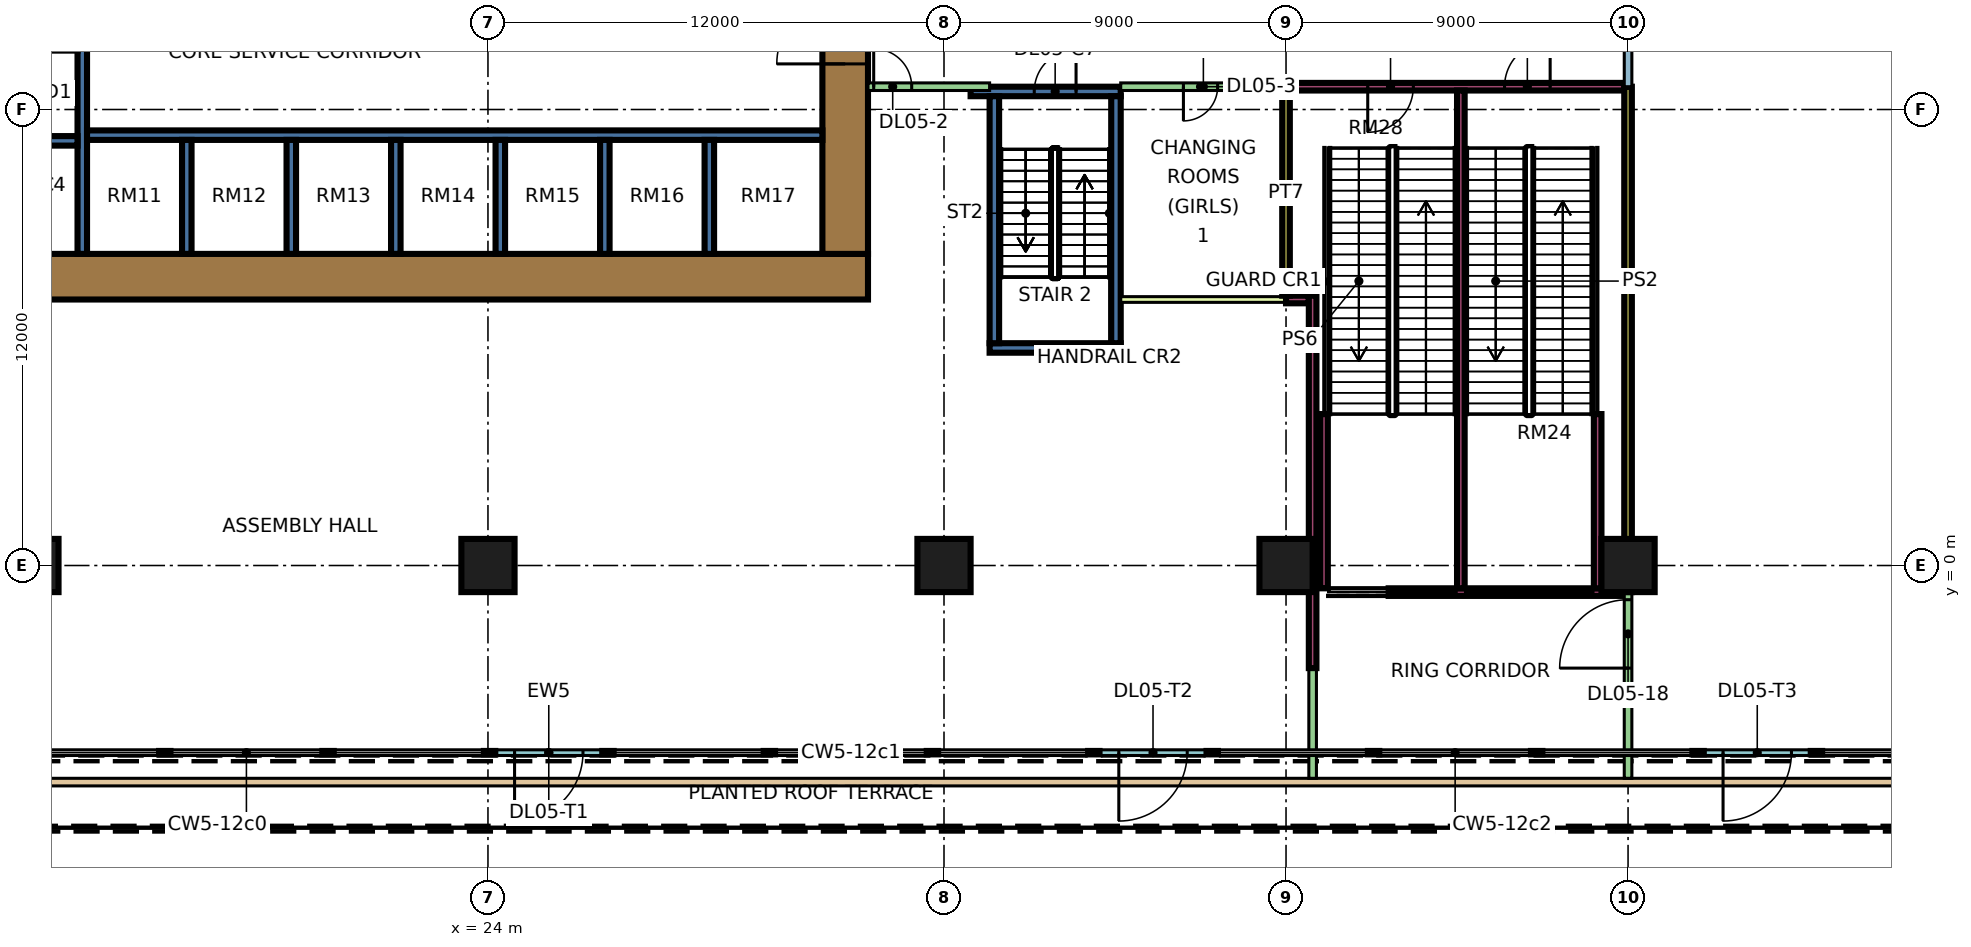
"""IFC4 building model, lengths in metres.
Left out: names, types, materials, properties, quantities, classifications, styles, units other than length and angle.
Written with IfcOpenShell. Run it as: python <this file> out.ifc"""

import sys

from ifc_helpers import new_model, si_unit, direction, frame, frame_2d, origin, origin_2d, place, context, subcontext, project, spatial, rectangle, extrude, element, fill, save


model = new_model("IFC4")
c1 = context("Model", 3, precision=1e-05, world=origin(), true_north=direction((0.0, 1.0)))
c2 = subcontext(c1, "Body", "Model", "MODEL_VIEW")
j1 = project(units=[si_unit("LENGTHUNIT", "METRE"), si_unit("PLANEANGLEUNIT", "RADIAN")], contexts=[c1])
p1 = place(None, origin())
s1 = spatial("IfcSite", under=j1, at=p1, CompositionType="ELEMENT")
p2 = place(p1, origin())
s2 = spatial("IfcBuilding", under=s1, at=p2, CompositionType="ELEMENT")
p3 = place(p2, frame((0.0, 0.0, 26.4)))
s3 = spatial("IfcBuildingStorey", under=s2, at=p3, CompositionType="ELEMENT", Elevation=26.4)
for number, where, z_axis, x_axis in (
    (1, (12.0, 0.0, 0.0), (0.0, 0.0, 1.0), (1.0, 0.0, 0.0)),
    (2, (24.0, 0.0, 0.0), (0.0, 0.0, 1.0), (1.0, 0.0, 0.0)),
    (3, (36.0, 0.0, 0.0), (0.0, 0.0, 1.0), (1.0, 0.0, 0.0)),
    (4, (45.0, 0.0, 0.0), (0.0, 0.0, 1.0), (1.0, 0.0, 0.0)),
    (5, (54.0, 0.0, 0.0), (0.0, 0.0, 1.0), (1.0, 0.0, 0.0)),
):
    element("IfcColumn", number, at=place(p3, frame(where, z_axis=z_axis, x_axis=x_axis)), inside=s3, PredefinedType="COLUMN", context=c2, shape_type="SweptSolid", body=[
        extrude(rectangle(XDim=1.4, YDim=1.4, at=origin_2d()), origin(), (0.0, 0.0, 1.0), 9.0),
    ])
p4 = place(p3, frame((9.0, 7.6, 0.0), z_axis=(0.0, 0.0, 1.0), x_axis=(1.0, 0.0, 0.0)))
e6 = element("IfcWall", 6, at=p4, inside=s3, PredefinedType="SHEAR", context=c2, shape_type="SweptSolid", body=[
    extrude(rectangle(XDim=25.0, YDim=1.2, at=frame_2d((12.5, 0.0))), origin(), (0.0, 0.0, 1.0), 9.0),
])
p5 = place(p3, frame((33.4, 8.2, 0.0), z_axis=(0.0, 0.0, 1.0), x_axis=(0.0, 1.0, 0.0)))
e7 = element("IfcWall", 7, at=p5, inside=s3, PredefinedType="SHEAR", context=c2, shape_type="SweptSolid", body=[
    extrude(rectangle(XDim=10.6, YDim=1.2, at=frame_2d((5.3, 0.0))), origin(), (0.0, 0.0, 1.0), 9.0),
])
p6 = place(p5, frame((5.0, 0.0, 0.0)))
e8 = element("IfcOpeningElement", 8, at=p6, cuts=e7, PredefinedType="OPENING", context=c2, shape_type="SweptSolid", body=[
    extrude(rectangle(XDim=1.8, YDim=2.4, at=frame_2d((0.9, 1.2))), frame((0.0, 0.61, 0.0), z_axis=(0.0, -1.0, 0.0), x_axis=(1.0, 0.0, 0.0)), (0.0, 0.0, 1.0), 1.22),
])
p7 = place(p3, frame((13.325, 8.2, 0.0), z_axis=(0.0, 0.0, 1.0), x_axis=(0.0, 1.0, 0.0)))
e9 = element("IfcWall", 9, at=p7, inside=s3, PredefinedType="SHEAR", context=c2, shape_type="SweptSolid", body=[
    extrude(rectangle(XDim=10.6, YDim=0.25, at=frame_2d((5.3, 0.0))), origin(), (0.0, 0.0, 1.0), 9.0),
])
p8 = place(p3, frame((13.45, 11.325, 0.0), z_axis=(0.0, 0.0, 1.0), x_axis=(1.0, 0.0, 0.0)))
e10 = element("IfcWall", 10, at=p8, inside=s3, PredefinedType="SHEAR", context=c2, shape_type="SweptSolid", body=[
    extrude(rectangle(XDim=19.35, YDim=0.25, at=frame_2d((9.675, 0.0))), origin(), (0.0, 0.0, 1.0), 9.0),
])
for number, where, z_axis, x_axis in (
    (11, (10.2, 11.175, 0.0), (0.0, 0.0, 1.0), (1.0, 0.0, 0.0)),
    (12, (16.075, 8.2, 0.0), (0.0, 0.0, 1.0), (0.0, 1.0, 0.0)),
    (13, (18.825, 8.2, 0.0), (0.0, 0.0, 1.0), (0.0, 1.0, 0.0)),
    (14, (21.575, 8.2, 0.0), (0.0, 0.0, 1.0), (0.0, 1.0, 0.0)),
    (15, (24.325, 8.2, 0.0), (0.0, 0.0, 1.0), (0.0, 1.0, 0.0)),
    (16, (27.075, 8.2, 0.0), (0.0, 0.0, 1.0), (0.0, 1.0, 0.0)),
    (17, (29.825, 8.2, 0.0), (0.0, 0.0, 1.0), (0.0, 1.0, 0.0)),
):
    element("IfcWall", number, at=place(p3, frame(where, z_axis=z_axis, x_axis=x_axis)), inside=s3, PredefinedType="SHEAR", context=c2, shape_type="SweptSolid", body=[
        extrude(rectangle(XDim=3.0, YDim=0.25, at=frame_2d((1.5, 0.0))), origin(), (0.0, 0.0, 1.0), 9.0),
    ])
p9 = place(p3, frame((37.2, 5.725, 0.0), z_axis=(0.0, 0.0, 1.0), x_axis=(1.0, 0.0, 0.0)))
e18 = element("IfcWall", 18, at=p9, inside=s3, PredefinedType="SHEAR", context=c2, shape_type="SweptSolid", body=[
    extrude(rectangle(XDim=3.45, YDim=0.25, at=frame_2d((1.725, 0.0))), origin(), (0.0, 0.0, 1.0), 9.0),
])
p10 = place(p3, frame((36.7, 12.475, 0.0), z_axis=(0.0, 0.0, 1.0), x_axis=(1.0, 0.0, 0.0)))
e19 = element("IfcWall", 19, at=p10, inside=s3, PredefinedType="SHEAR", context=c2, shape_type="SweptSolid", body=[
    extrude(rectangle(XDim=3.95, YDim=0.25, at=frame_2d((1.975, 0.0))), origin(), (0.0, 0.0, 1.0), 9.0),
])
p11 = place(p10, frame((1.675, 0.0, 0.0)))
e20 = element("IfcOpeningElement", 20, at=p11, cuts=e19, PredefinedType="OPENING", context=c2, shape_type="SweptSolid", body=[
    extrude(rectangle(XDim=1.1, YDim=2.2, at=frame_2d((0.55, 1.1))), frame((0.0, 0.135, 0.0), z_axis=(0.0, -1.0, 0.0), x_axis=(1.0, 0.0, 0.0)), (0.0, 0.0, 1.0), 0.27),
])
for number, where, z_axis, x_axis in (
    (21, (37.325, 5.85, 0.0), (0.0, 0.0, 1.0), (0.0, 1.0, 0.0)),
    (22, (40.525, 5.85, 0.0), (0.0, 0.0, 1.0), (0.0, 1.0, 0.0)),
):
    element("IfcWall", number, at=place(p3, frame(where, z_axis=z_axis, x_axis=x_axis)), inside=s3, PredefinedType="SHEAR", context=c2, shape_type="SweptSolid", body=[
        extrude(rectangle(XDim=6.5, YDim=0.25, at=frame_2d((3.25, 0.0))), origin(), (0.0, 0.0, 1.0), 9.0),
    ])
p12 = place(p3, frame((24.1, -4.925, 0.0), z_axis=(0.0, 0.0, 1.0), x_axis=(1.0, 0.0, 0.0)))
e23 = element("IfcWall", 23, at=p12, inside=s3, PredefinedType="SOLIDWALL", context=c2, shape_type="SweptSolid", body=[
    extrude(rectangle(XDim=3.0, YDim=0.15, at=frame_2d((1.5, 0.0))), origin(), (0.0, 0.0, 1.0), 8.45),
])
p13 = place(p12, frame((0.6, 0.0, 0.0)))
e24 = element("IfcOpeningElement", 24, at=p13, cuts=e23, PredefinedType="OPENING", context=c2, shape_type="SweptSolid", body=[
    extrude(rectangle(XDim=1.8, YDim=2.4, at=frame_2d((0.9, 1.2))), frame((0.0, 0.085, 0.0), z_axis=(0.0, -1.0, 0.0), x_axis=(1.0, 0.0, 0.0)), (0.0, 0.0, 1.0), 0.17),
])
p14 = place(p3, frame((40.0, -4.925, 0.0), z_axis=(0.0, 0.0, 1.0), x_axis=(1.0, 0.0, 0.0)))
e25 = element("IfcWall", 25, at=p14, inside=s3, PredefinedType="SOLIDWALL", context=c2, shape_type="SweptSolid", body=[
    extrude(rectangle(XDim=3.0, YDim=0.15, at=frame_2d((1.5, 0.0))), origin(), (0.0, 0.0, 1.0), 8.45),
])
p15 = place(p14, frame((0.6, 0.0, 0.0)))
e26 = element("IfcOpeningElement", 26, at=p15, cuts=e25, PredefinedType="OPENING", context=c2, shape_type="SweptSolid", body=[
    extrude(rectangle(XDim=1.8, YDim=2.4, at=frame_2d((0.9, 1.2))), frame((0.0, 0.085, 0.0), z_axis=(0.0, -1.0, 0.0), x_axis=(1.0, 0.0, 0.0)), (0.0, 0.0, 1.0), 0.17),
])
p16 = place(p3, frame((55.9, -4.925, 0.0), z_axis=(0.0, 0.0, 1.0), x_axis=(1.0, 0.0, 0.0)))
e27 = element("IfcWall", 27, at=p16, inside=s3, PredefinedType="SOLIDWALL", context=c2, shape_type="SweptSolid", body=[
    extrude(rectangle(XDim=3.0, YDim=0.15, at=frame_2d((1.5, 0.0))), origin(), (0.0, 0.0, 1.0), 8.45),
])
p17 = place(p16, frame((0.6, 0.0, 0.0)))
e28 = element("IfcOpeningElement", 28, at=p17, cuts=e27, PredefinedType="OPENING", context=c2, shape_type="SweptSolid", body=[
    extrude(rectangle(XDim=1.8, YDim=2.4, at=frame_2d((0.9, 1.2))), frame((0.0, 0.085, 0.0), z_axis=(0.0, -1.0, 0.0), x_axis=(1.0, 0.0, 0.0)), (0.0, 0.0, 1.0), 0.17),
])
p18 = place(p3, frame((72.24, -5.7, 0.0), z_axis=(0.0, 0.0, 1.0), x_axis=(-1.0, 0.0, 0.0)))
e29 = element("IfcWall", 29, at=p18, inside=s3, PredefinedType="PARAPET", context=c2, shape_type="SweptSolid", body=[
    extrude(rectangle(XDim=61.479, YDim=0.2, at=frame_2d((30.74, 0.0))), origin(), (0.0, 0.0, 1.0), 0.5),
])
p19 = place(p3, frame((34.0, 12.6, 0.0), z_axis=(0.0, 0.0, 1.0), x_axis=(1.0, 0.0, 0.0)))
e30 = element("IfcWall", 30, at=p19, inside=s3, PredefinedType="PARTITIONING", context=c2, shape_type="SweptSolid", body=[
    extrude(rectangle(XDim=3.2, YDim=0.2, at=frame_2d((1.6, 0.0))), origin(), (0.0, 0.0, 1.0), 8.45),
])
p20 = place(p19, frame((0.15, 0.0, 0.0)))
e31 = element("IfcOpeningElement", 31, at=p20, cuts=e30, PredefinedType="OPENING", context=c2, shape_type="SweptSolid", body=[
    extrude(rectangle(XDim=1.0, YDim=2.1, at=frame_2d((0.5, 1.05))), frame((0.0, 0.11, 0.0), z_axis=(0.0, -1.0, 0.0), x_axis=(1.0, 0.0, 0.0)), (0.0, 0.0, 1.0), 0.22),
])
p21 = place(p3, frame((40.65, 7.0, 0.0), z_axis=(0.0, 0.0, 1.0), x_axis=(1.0, 0.0, 0.0)))
e32 = element("IfcWall", 32, at=p21, inside=s3, PredefinedType="PARTITIONING", context=c2, shape_type="SweptSolid", body=[
    extrude(rectangle(XDim=4.35, YDim=0.15, at=frame_2d((2.175, 0.0))), origin(), (0.0, 0.0, 1.0), 8.45),
])
p22 = place(p3, frame((40.65, 12.6, 0.0), z_axis=(0.0, 0.0, 1.0), x_axis=(1.0, 0.0, 0.0)))
e33 = element("IfcWall", 33, at=p22, inside=s3, PredefinedType="PARTITIONING", context=c2, shape_type="SweptSolid", body=[
    extrude(rectangle(XDim=4.35, YDim=0.2, at=frame_2d((2.175, 0.0))), origin(), (0.0, 0.0, 1.0), 8.45),
])
p23 = place(p22, frame((1.65, 0.0, 0.0)))
e34 = element("IfcOpeningElement", 34, at=p23, cuts=e33, PredefinedType="OPENING", context=c2, shape_type="SweptSolid", body=[
    extrude(rectangle(XDim=0.9, YDim=2.1, at=frame_2d((0.45, 1.05))), frame((0.0, 0.11, 0.0), z_axis=(0.0, -1.0, 0.0), x_axis=(1.0, 0.0, 0.0)), (0.0, 0.0, 1.0), 0.22),
])
p24 = place(p3, frame((45.0, 7.0, 0.0), z_axis=(0.0, 0.0, 1.0), x_axis=(1.0, 0.0, 0.0)))
e35 = element("IfcWall", 35, at=p24, inside=s3, PredefinedType="SOLIDWALL", context=c2, shape_type="SweptSolid", body=[
    extrude(rectangle(XDim=0.6, YDim=0.2, at=frame_2d((0.3, 0.0))), origin(), (0.0, 0.0, 1.0), 8.45),
])
p25 = place(p3, frame((45.0, 7.1, 0.0), z_axis=(0.0, 0.0, 1.0), x_axis=(0.0, 1.0, 0.0)))
e36 = element("IfcWall", 36, at=p25, inside=s3, PredefinedType="SOLIDWALL", context=c2, shape_type="SweptSolid", body=[
    extrude(rectangle(XDim=5.4, YDim=0.2, at=frame_2d((2.7, 0.0))), origin(), (0.0, 0.0, 1.0), 6.55),
])
p26 = place(p3, frame((45.0, 12.6, 0.0), z_axis=(0.0, 0.0, 1.0), x_axis=(1.0, 0.0, 0.0)))
e37 = element("IfcWall", 37, at=p26, inside=s3, PredefinedType="SOLIDWALL", context=c2, shape_type="SweptSolid", body=[
    extrude(rectangle(XDim=8.9, YDim=0.2, at=frame_2d((4.45, 0.0))), origin(), (0.0, 0.0, 1.0), 8.45),
])
p27 = place(p26, frame((5.75, 0.0, 0.0)))
e38 = element("IfcOpeningElement", 38, at=p27, cuts=e37, PredefinedType="OPENING", context=c2, shape_type="SweptSolid", body=[
    extrude(rectangle(XDim=1.2, YDim=2.1, at=frame_2d((0.6, 1.05))), frame((0.0, 0.11, 0.0), z_axis=(0.0, -1.0, 0.0), x_axis=(1.0, 0.0, 0.0)), (0.0, 0.0, 1.0), 0.22),
])
p28 = place(p26, frame((2.15, 0.0, 0.0)))
e39 = element("IfcOpeningElement", 39, at=p28, cuts=e37, PredefinedType="OPENING", context=c2, shape_type="SweptSolid", body=[
    extrude(rectangle(XDim=1.2, YDim=2.1, at=frame_2d((0.6, 1.05))), frame((0.0, 0.11, 0.0), z_axis=(0.0, -1.0, 0.0), x_axis=(1.0, 0.0, 0.0)), (0.0, 0.0, 1.0), 0.22),
])
p29 = place(p3, frame((45.7, -5.6, 0.0), z_axis=(0.0, 0.0, 1.0), x_axis=(0.0, 1.0, 0.0)))
e40 = element("IfcWall", 40, at=p29, inside=s3, PredefinedType="PARTITIONING", context=c2, shape_type="SweptSolid", body=[
    extrude(rectangle(XDim=2.9, YDim=0.2, at=frame_2d((1.45, 0.0))), origin(), (0.0, 0.0, 1.0), 8.45),
])
p30 = place(p3, frame((45.7, -2.7, 0.0), z_axis=(0.0, 0.0, 1.0), x_axis=(0.0, 1.0, 0.0)))
e41 = element("IfcWall", 41, at=p30, inside=s3, PredefinedType="SOLIDWALL", context=c2, shape_type="SweptSolid", body=[
    extrude(rectangle(XDim=9.8, YDim=0.2, at=frame_2d((4.9, 0.0))), origin(), (0.0, 0.0, 1.0), 8.45),
])
p31 = place(p3, frame((47.7, -0.7, 0.0), z_axis=(0.0, 0.0, 1.0), x_axis=(1.0, 0.0, 0.0)))
e42 = element("IfcWall", 42, at=p31, inside=s3, PredefinedType="SOLIDWALL", context=c2, shape_type="SweptSolid", body=[
    extrude(rectangle(XDim=6.2, YDim=0.2, at=frame_2d((3.1, 0.0))), origin(), (0.0, 0.0, 1.0), 8.45),
])
p32 = place(p3, frame((49.6, -0.6, 0.0), z_axis=(0.0, 0.0, 1.0), x_axis=(0.0, 1.0, 0.0)))
e43 = element("IfcWall", 43, at=p32, inside=s3, PredefinedType="SOLIDWALL", context=c2, shape_type="SweptSolid", body=[
    extrude(rectangle(XDim=13.1, YDim=0.2, at=frame_2d((6.55, 0.0))), origin(), (0.0, 0.0, 1.0), 8.45),
])
p33 = place(p3, frame((54.0, -5.6, 0.0), z_axis=(0.0, 0.0, 1.0), x_axis=(0.0, 1.0, 0.0)))
e44 = element("IfcWall", 44, at=p33, inside=s3, PredefinedType="PARTITIONING", context=c2, shape_type="SweptSolid", body=[
    extrude(rectangle(XDim=4.9, YDim=0.2, at=frame_2d((2.45, 0.0))), origin(), (0.0, 0.0, 1.0), 8.45),
])
p34 = place(p33, frame((2.9, 0.0, 0.0)))
e45 = element("IfcOpeningElement", 45, at=p34, cuts=e44, PredefinedType="OPENING", context=c2, shape_type="SweptSolid", body=[
    extrude(rectangle(XDim=1.8, YDim=2.1, at=frame_2d((0.9, 1.05))), frame((0.0, 0.11, 0.0), z_axis=(0.0, -1.0, 0.0), x_axis=(1.0, 0.0, 0.0)), (0.0, 0.0, 1.0), 0.22),
])
p35 = place(p3, frame((54.0, -0.7, 0.0), z_axis=(0.0, 0.0, 1.0), x_axis=(0.0, 1.0, 0.0)))
e46 = element("IfcWall", 46, at=p35, inside=s3, PredefinedType="SOLIDWALL", context=c2, shape_type="SweptSolid", body=[
    extrude(rectangle(XDim=13.3, YDim=0.2, at=frame_2d((6.65, 0.0))), origin(), (0.0, 0.0, 1.0), 6.55),
])
p36 = place(p3, frame((54.0, 12.6, 0.0), z_axis=(0.0, 0.0, 1.0), x_axis=(0.0, 1.0, 0.0)))
e47 = element("IfcWall", 47, at=p36, inside=s3, PredefinedType="PARTITIONING", context=c2, shape_type="SweptSolid", body=[
    extrude(rectangle(XDim=3.0, YDim=0.2, at=frame_2d((1.5, 0.0))), origin(), (0.0, 0.0, 1.0), 6.55),
])
for number, where, z_axis, x_axis in (
    (48, (53.2, -0.6, 0.0), (0.0, 0.0, 1.0), (0.0, 1.0, 0.0)),
    (49, (46.0, -0.6, 0.0), (0.0, 0.0, 1.0), (0.0, 1.0, 0.0)),
):
    element("IfcWall", number, at=place(p3, frame(where, z_axis=z_axis, x_axis=x_axis)), inside=s3, PredefinedType="SOLIDWALL", context=c2, shape_type="SweptSolid", body=[
        extrude(rectangle(XDim=4.585, YDim=0.2, at=frame_2d((2.292, 0.0))), origin(), (0.0, 0.0, 1.0), 8.45),
    ])
p37 = place(p13, frame((1.8, 0.0, 0.0), z_axis=(0.0, 0.0, 1.0), x_axis=(-1.0, 0.0, 0.0)))
e50 = element("IfcDoor", 50, at=p37, inside=s3, OperationType="DOUBLE_DOOR_SINGLE_SWING", PredefinedType="DOOR", context=c2, shape_type="SweptSolid", body=[
    extrude(rectangle(XDim=1.8, YDim=2.4, at=frame_2d((0.9, 1.2))), frame((0.0, 0.025, 0.0), z_axis=(0.0, -1.0, 0.0), x_axis=(1.0, 0.0, 0.0)), (0.0, 0.0, 1.0), 0.05),
])
fill(e24, e50)
p38 = place(p15, frame((1.8, 0.0, 0.0), z_axis=(0.0, 0.0, 1.0), x_axis=(-1.0, 0.0, 0.0)))
e51 = element("IfcDoor", 51, at=p38, inside=s3, OperationType="DOUBLE_DOOR_SINGLE_SWING", PredefinedType="DOOR", context=c2, shape_type="SweptSolid", body=[
    extrude(rectangle(XDim=1.8, YDim=2.4, at=frame_2d((0.9, 1.2))), frame((0.0, 0.025, 0.0), z_axis=(0.0, -1.0, 0.0), x_axis=(1.0, 0.0, 0.0)), (0.0, 0.0, 1.0), 0.05),
])
fill(e26, e51)
p39 = place(p17, frame((1.8, 0.0, 0.0), z_axis=(0.0, 0.0, 1.0), x_axis=(-1.0, 0.0, 0.0)))
e52 = element("IfcDoor", 52, at=p39, inside=s3, OperationType="DOUBLE_DOOR_SINGLE_SWING", PredefinedType="DOOR", context=c2, shape_type="SweptSolid", body=[
    extrude(rectangle(XDim=1.8, YDim=2.4, at=frame_2d((0.9, 1.2))), frame((0.0, 0.025, 0.0), z_axis=(0.0, -1.0, 0.0), x_axis=(1.0, 0.0, 0.0)), (0.0, 0.0, 1.0), 0.05),
])
fill(e28, e52)
p40 = place(p6, origin())
e53 = element("IfcDoor", 53, at=p40, inside=s3, OperationType="DOUBLE_DOOR_SINGLE_SWING", PredefinedType="DOOR", context=c2, shape_type="SweptSolid", body=[
    extrude(rectangle(XDim=1.8, YDim=2.4, at=frame_2d((0.9, 1.2))), frame((0.0, 0.025, 0.0), z_axis=(0.0, -1.0, 0.0), x_axis=(1.0, 0.0, 0.0)), (0.0, 0.0, 1.0), 0.05),
])
fill(e8, e53)
p41 = place(p11, frame((1.1, 0.0, 0.0), z_axis=(0.0, 0.0, 1.0), x_axis=(-1.0, 0.0, 0.0)))
e54 = element("IfcDoor", 54, at=p41, inside=s3, OperationType="SINGLE_SWING_RIGHT", PredefinedType="DOOR", context=c2, shape_type="SweptSolid", body=[
    extrude(rectangle(XDim=1.1, YDim=2.2, at=frame_2d((0.55, 1.1))), frame((0.0, 0.025, 0.0), z_axis=(0.0, -1.0, 0.0), x_axis=(1.0, 0.0, 0.0)), (0.0, 0.0, 1.0), 0.05),
])
fill(e20, e54)
p42 = place(p20, origin())
e55 = element("IfcDoor", 55, at=p42, inside=s3, OperationType="SINGLE_SWING_LEFT", PredefinedType="DOOR", context=c2, shape_type="SweptSolid", body=[
    extrude(rectangle(XDim=1.0, YDim=2.1, at=frame_2d((0.5, 1.05))), frame((0.0, 0.025, 0.0), z_axis=(0.0, -1.0, 0.0), x_axis=(1.0, 0.0, 0.0)), (0.0, 0.0, 1.0), 0.05),
])
fill(e31, e55)
p43 = place(p23, frame((0.9, 0.0, 0.0), z_axis=(0.0, 0.0, 1.0), x_axis=(-1.0, 0.0, 0.0)))
e56 = element("IfcDoor", 56, at=p43, inside=s3, OperationType="SINGLE_SWING_LEFT", PredefinedType="DOOR", context=c2, shape_type="SweptSolid", body=[
    extrude(rectangle(XDim=0.9, YDim=2.1, at=frame_2d((0.45, 1.05))), frame((0.0, 0.025, 0.0), z_axis=(0.0, -1.0, 0.0), x_axis=(1.0, 0.0, 0.0)), (0.0, 0.0, 1.0), 0.05),
])
fill(e34, e56)
p44 = place(p34, origin())
e57 = element("IfcDoor", 57, at=p44, inside=s3, OperationType="DOUBLE_DOOR_SINGLE_SWING", PredefinedType="DOOR", context=c2, shape_type="SweptSolid", body=[
    extrude(rectangle(XDim=1.8, YDim=2.1, at=frame_2d((0.9, 1.05))), frame((0.0, 0.025, 0.0), z_axis=(0.0, -1.0, 0.0), x_axis=(1.0, 0.0, 0.0)), (0.0, 0.0, 1.0), 0.05),
])
fill(e45, e57)
p45 = place(p27, frame((1.2, 0.0, 0.0), z_axis=(0.0, 0.0, 1.0), x_axis=(-1.0, 0.0, 0.0)))
e58 = element("IfcDoor", 58, at=p45, inside=s3, OperationType="SINGLE_SWING_RIGHT", PredefinedType="DOOR", context=c2, shape_type="SweptSolid", body=[
    extrude(rectangle(XDim=1.2, YDim=2.1, at=frame_2d((0.6, 1.05))), frame((0.0, 0.025, 0.0), z_axis=(0.0, -1.0, 0.0), x_axis=(1.0, 0.0, 0.0)), (0.0, 0.0, 1.0), 0.05),
])
fill(e38, e58)
p46 = place(p28, frame((1.2, 0.0, 0.0), z_axis=(0.0, 0.0, 1.0), x_axis=(-1.0, 0.0, 0.0)))
e59 = element("IfcDoor", 59, at=p46, inside=s3, OperationType="SINGLE_SWING_LEFT", PredefinedType="DOOR", context=c2, shape_type="SweptSolid", body=[
    extrude(rectangle(XDim=1.2, YDim=2.1, at=frame_2d((0.6, 1.05))), frame((0.0, 0.025, 0.0), z_axis=(0.0, -1.0, 0.0), x_axis=(1.0, 0.0, 0.0)), (0.0, 0.0, 1.0), 0.05),
])
fill(e39, e59)
save(model, sys.argv[1])
